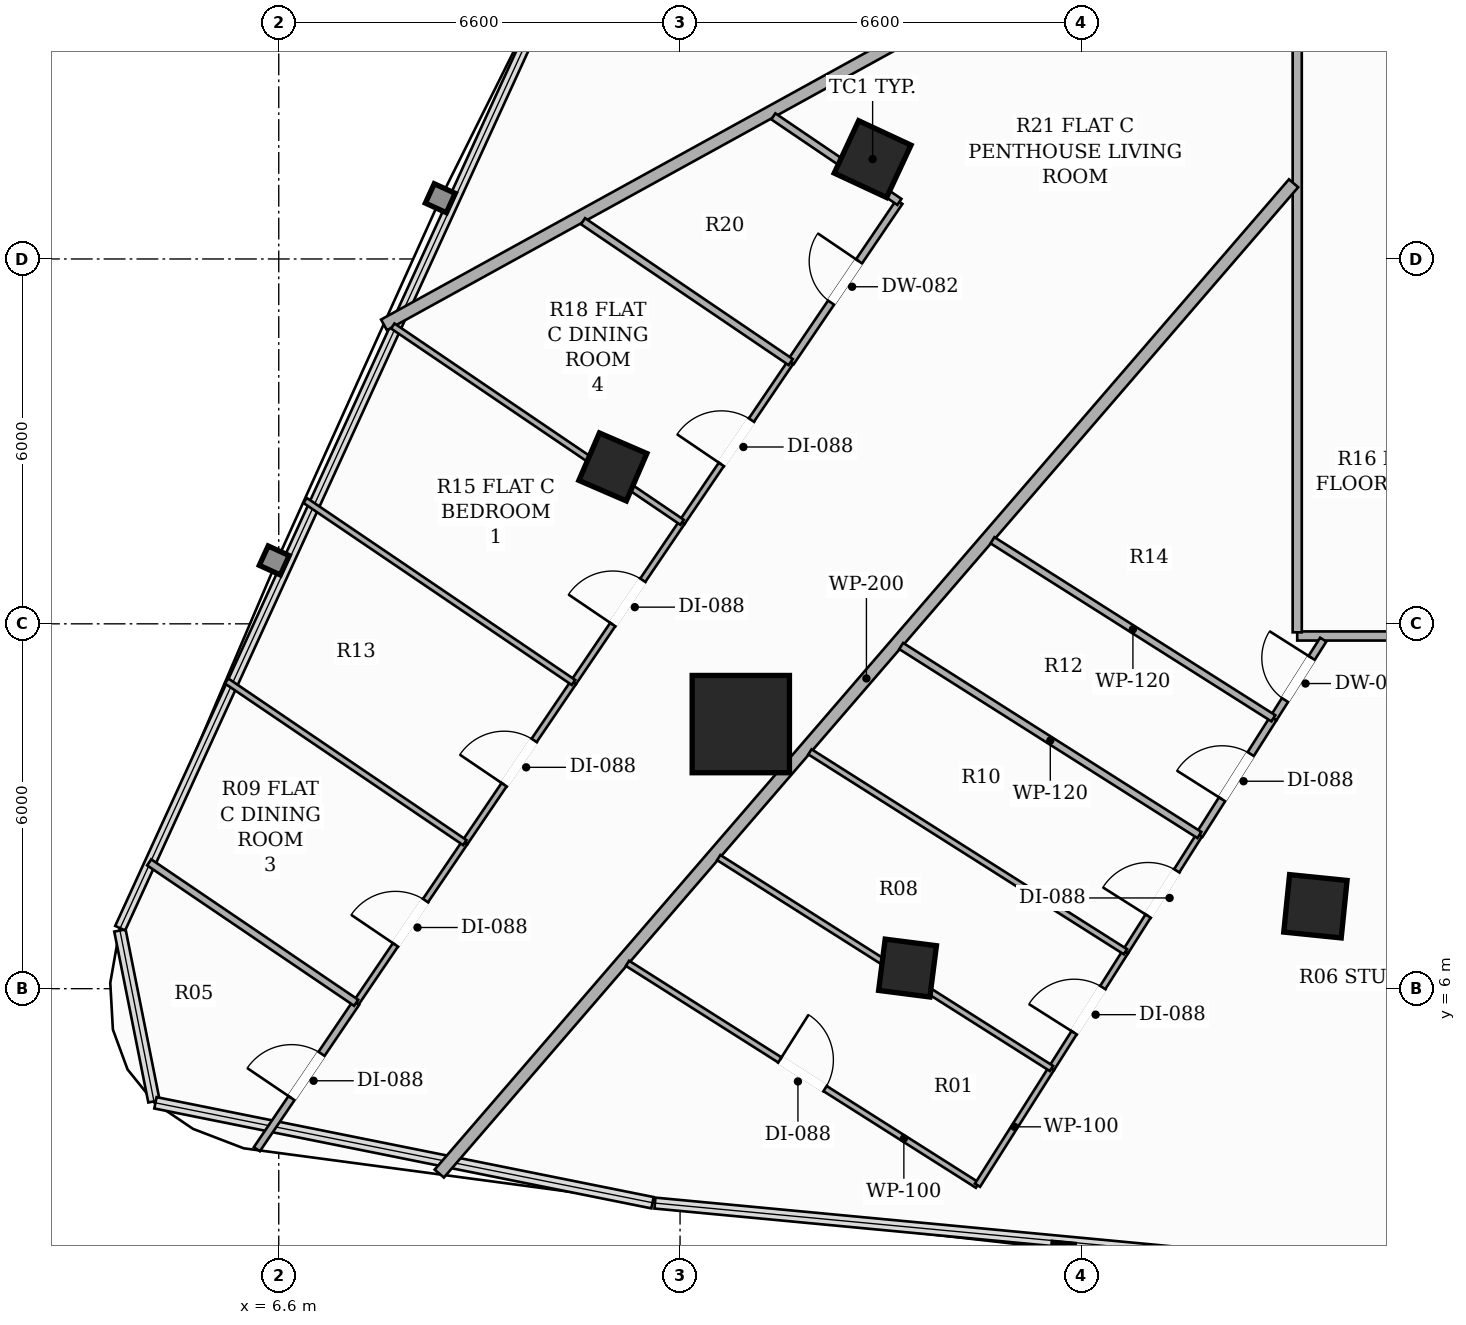
"""IFC4 building model, lengths in metres.
Left out: names, types, materials, properties, quantities, classifications, styles, units other than length and angle.
Written with IfcOpenShell. Run it as: python <this file> out.ifc"""

import sys

from ifc_helpers import new_model, si_unit, direction, frame, frame_2d, origin, origin_2d, place, context, subcontext, project, spatial, rectangle, hollow_rectangle, extrude, element, fill, save


model = new_model("IFC4")
c1 = context("Model", 3, precision=1e-05, world=origin(), true_north=direction((0.0, 1.0)))
c2 = subcontext(c1, "Body", "Model", "MODEL_VIEW")
j1 = project(units=[si_unit("LENGTHUNIT", "METRE"), si_unit("PLANEANGLEUNIT", "RADIAN")], contexts=[c1])
p1 = place(None, origin())
s1 = spatial("IfcSite", under=j1, at=p1, CompositionType="ELEMENT")
p2 = place(p1, origin())
s2 = spatial("IfcBuilding", under=s1, at=p2, CompositionType="ELEMENT")
p3 = place(p2, frame((0.0, 0.0, 26.9)))
s3 = spatial("IfcBuildingStorey", under=s2, at=p3, CompositionType="ELEMENT", Elevation=26.9)
p4 = place(p3, frame((14.199, 10.351, 0.0), z_axis=(0.0, 0.0, 1.0), x_axis=(1.0, 0.0, 0.0)))
e1 = element("IfcColumn", 1, at=p4, inside=s3, PredefinedType="COLUMN", context=c2, shape_type="SweptSolid", body=[
    extrude(hollow_rectangle(XDim=1.6, YDim=1.6, WallThickness=0.05, at=origin_2d()), origin(), (0.0, 0.0, 1.0), 3.3),
])
for number, where, z_axis, x_axis in (
    (2, (16.367, 19.642, 0.0), (0.0, 0.0, 1.0), (0.423, 0.906, 0.0)),
    (3, (23.649, 7.355, 0.0), (0.0, 0.0, 1.0), (-0.995, 0.101, 0.0)),
):
    element("IfcColumn", number, at=place(p3, frame(where, z_axis=z_axis, x_axis=x_axis)), inside=s3, PredefinedType="COLUMN", context=c2, shape_type="SweptSolid", body=[
        extrude(hollow_rectangle(XDim=0.95, YDim=0.95, WallThickness=0.032, at=origin_2d()), origin(), (0.0, 0.0, 1.0), 3.3),
    ])
for number, where, z_axis, x_axis in (
    (4, (12.095, 14.58, 0.0), (0.0, 0.0, 1.0), (0.397, 0.918, 0.0)),
    (5, (16.941, 6.339, 0.0), (0.0, 0.0, 1.0), (-0.992, 0.127, 0.0)),
):
    element("IfcColumn", number, at=place(p3, frame(where, z_axis=z_axis, x_axis=x_axis)), inside=s3, PredefinedType="COLUMN", context=c2, shape_type="SweptSolid", body=[
        extrude(hollow_rectangle(XDim=0.85, YDim=0.85, WallThickness=0.028, at=origin_2d()), origin(), (0.0, 0.0, 1.0), 3.3),
    ])
p5 = place(p3, frame((42.59, 11.8, 0.0), z_axis=(0.0, 0.0, 1.0), x_axis=(-1.0, 0.0, 0.0)))
e6 = element("IfcWall", 6, at=p5, inside=s3, PredefinedType="PARTITIONING", context=c2, shape_type="SweptSolid", body=[
    extrude(rectangle(XDim=19.24, YDim=0.15, at=frame_2d((9.62, 0.0))), origin(), (0.0, 0.0, 1.0), 2.669),
])
p6 = place(p5, frame((12.818, 0.0, 0.0)))
e7 = element("IfcOpeningElement", 7, at=p6, cuts=e6, PredefinedType="OPENING", context=c2, shape_type="SweptSolid", body=[
    extrude(rectangle(XDim=0.92, YDim=2.15, at=frame_2d((0.46, 1.075))), frame((0.0, 0.085, 0.0), z_axis=(0.0, -1.0, 0.0), x_axis=(1.0, 0.0, 0.0)), (0.0, 0.0, 1.0), 0.17),
])
p7 = place(p5, frame((3.519, 0.0, 0.0)))
e8 = element("IfcOpeningElement", 8, at=p7, cuts=e6, PredefinedType="OPENING", context=c2, shape_type="SweptSolid", body=[
    extrude(rectangle(XDim=0.88, YDim=2.1, at=frame_2d((0.44, 1.05))), frame((0.0, 0.085, 0.0), z_axis=(0.0, -1.0, 0.0), x_axis=(1.0, 0.0, 0.0)), (0.0, 0.0, 1.0), 0.17),
])
p8 = place(p3, frame((23.35, 11.86, 0.0), z_axis=(0.0, 0.0, 1.0), x_axis=(0.0, 1.0, 0.0)))
e9 = element("IfcWall", 9, at=p8, inside=s3, PredefinedType="PARTITIONING", context=c2, shape_type="SweptSolid", body=[
    extrude(rectangle(XDim=25.04, YDim=0.15, at=frame_2d((12.52, 0.0))), origin(), (0.0, 0.0, 1.0), 2.413),
])
p9 = place(p8, frame((9.872, 0.0, 0.0)))
e10 = element("IfcOpeningElement", 10, at=p9, cuts=e9, PredefinedType="OPENING", context=c2, shape_type="SweptSolid", body=[
    extrude(rectangle(XDim=0.92, YDim=2.15, at=frame_2d((0.46, 1.075))), frame((0.0, 0.085, 0.0), z_axis=(0.0, -1.0, 0.0), x_axis=(1.0, 0.0, 0.0)), (0.0, 0.0, 1.0), 0.17),
])
p10 = place(p8, frame((18.578, 0.0, 0.0)))
e11 = element("IfcOpeningElement", 11, at=p10, cuts=e9, PredefinedType="OPENING", context=c2, shape_type="SweptSolid", body=[
    extrude(rectangle(XDim=0.88, YDim=2.1, at=frame_2d((0.44, 1.05))), frame((0.0, 0.085, 0.0), z_axis=(0.0, -1.0, 0.0), x_axis=(1.0, 0.0, 0.0)), (0.0, 0.0, 1.0), 0.17),
])
p11 = place(p3, frame((9.24, 2.959, 0.0), z_axis=(0.0, 0.0, 1.0), x_axis=(0.653213734957, 0.757173570896, 0.0)))
e12 = element("IfcWall", 12, at=p11, inside=s3, PredefinedType="PARTITIONING", context=c2, shape_type="SweptSolid", body=[
    extrude(rectangle(XDim=21.509, YDim=0.2, at=frame_2d((10.754, 0.0))), origin(), (0.0, 0.0, 1.0), 2.413),
])
p12 = place(p3, frame((8.331, 16.916, 0.0), z_axis=(0.0, 0.0, 1.0), x_axis=(0.875977946948, 0.482351154721, 0.0)))
e13 = element("IfcWall", 13, at=p12, inside=s3, PredefinedType="PARTITIONING", context=c2, shape_type="SweptSolid", body=[
    extrude(rectangle(XDim=17.077, YDim=0.2, at=frame_2d((8.539, 0.0))), origin(), (0.0, 0.0, 1.0), 2.413),
])
p13 = place(p3, frame((22.958, 10.446, 0.0), z_axis=(0.0, 0.0, 1.0), x_axis=(0.535317457649, 0.844650945383, 0.0)))
e14 = element("IfcWall", 14, at=p13, inside=s3, PredefinedType="PARTITIONING", context=c2, shape_type="SweptSolid", body=[
    extrude(rectangle(XDim=1.532, YDim=0.12, at=frame_2d((0.766, 0.0))), origin(), (0.0, 0.0, 1.0), 3.06),
])
p14 = place(p13, frame((0.356, 0.0, 0.0)))
e15 = element("IfcOpeningElement", 15, at=p14, cuts=e14, PredefinedType="OPENING", context=c2, shape_type="SweptSolid", body=[
    extrude(rectangle(XDim=0.82, YDim=2.1, at=frame_2d((0.41, 1.05))), frame((0.0, 0.07, 0.0), z_axis=(0.0, -1.0, 0.0), x_axis=(1.0, 0.0, 0.0)), (0.0, 0.0, 1.0), 0.14),
])
p15 = place(p3, frame((21.741, 8.527, 0.0), z_axis=(0.0, 0.0, 1.0), x_axis=(0.535588747522, 0.844478947948, 0.0)))
e16 = element("IfcWall", 16, at=p15, inside=s3, PredefinedType="PARTITIONING", context=c2, shape_type="SweptSolid", body=[
    extrude(rectangle(XDim=2.272, YDim=0.12, at=frame_2d((1.136, 0.0))), origin(), (0.0, 0.0, 1.0), 3.06),
])
p16 = place(p15, frame((0.696, 0.0, 0.0)))
e17 = element("IfcOpeningElement", 17, at=p16, cuts=e16, PredefinedType="OPENING", context=c2, shape_type="SweptSolid", body=[
    extrude(rectangle(XDim=0.88, YDim=2.1, at=frame_2d((0.44, 1.05))), frame((0.0, 0.07, 0.0), z_axis=(0.0, -1.0, 0.0), x_axis=(1.0, 0.0, 0.0)), (0.0, 0.0, 1.0), 0.14),
])
p17 = place(p3, frame((12.335, 6.417, 0.0), z_axis=(0.0, 0.0, 1.0), x_axis=(0.844634990869, -0.535342630657, 0.0)))
e18 = element("IfcWall", 18, at=p17, inside=s3, PredefinedType="PARTITIONING", context=c2, shape_type="SweptSolid", body=[
    extrude(rectangle(XDim=6.816, YDim=0.1, at=frame_2d((3.408, 0.0))), origin(), (0.0, 0.0, 1.0), 2.619),
])
p18 = place(p17, frame((2.968, 0.0, 0.0)))
e19 = element("IfcOpeningElement", 19, at=p18, cuts=e18, PredefinedType="OPENING", context=c2, shape_type="SweptSolid", body=[
    extrude(rectangle(XDim=0.88, YDim=2.1, at=frame_2d((0.44, 1.05))), frame((0.0, 0.06, 0.0), z_axis=(0.0, -1.0, 0.0), x_axis=(1.0, 0.0, 0.0)), (0.0, 0.0, 1.0), 0.12),
])
p19 = place(p3, frame((18.092, 2.768, 0.0), z_axis=(0.0, 0.0, 1.0), x_axis=(0.535087860904, 0.844796414003, 0.0)))
e20 = element("IfcWall", 20, at=p19, inside=s3, PredefinedType="PARTITIONING", context=c2, shape_type="SweptSolid", body=[
    extrude(rectangle(XDim=2.273, YDim=0.1, at=frame_2d((1.136, 0.0))), origin(), (0.0, 0.0, 1.0), 3.06),
])
p20 = place(p3, frame((19.308, 4.688, 0.0), z_axis=(0.0, 0.0, 1.0), x_axis=(0.535512120593, 0.844527541705, 0.0)))
e21 = element("IfcWall", 21, at=p20, inside=s3, PredefinedType="PARTITIONING", context=c2, shape_type="SweptSolid", body=[
    extrude(rectangle(XDim=2.272, YDim=0.1, at=frame_2d((1.136, 0.0))), origin(), (0.0, 0.0, 1.0), 2.413),
])
p21 = place(p20, frame((0.696, 0.0, 0.0)))
e22 = element("IfcOpeningElement", 22, at=p21, cuts=e21, PredefinedType="OPENING", context=c2, shape_type="SweptSolid", body=[
    extrude(rectangle(XDim=0.88, YDim=2.1, at=frame_2d((0.44, 1.05))), frame((0.0, 0.06, 0.0), z_axis=(0.0, -1.0, 0.0), x_axis=(1.0, 0.0, 0.0)), (0.0, 0.0, 1.0), 0.12),
])
p22 = place(p3, frame((20.525, 6.607, 0.0), z_axis=(0.0, 0.0, 1.0), x_axis=(0.53503930364, 0.844827167864, 0.0)))
e23 = element("IfcWall", 23, at=p22, inside=s3, PredefinedType="PARTITIONING", context=c2, shape_type="SweptSolid", body=[
    extrude(rectangle(XDim=2.273, YDim=0.1, at=frame_2d((1.136, 0.0))), origin(), (0.0, 0.0, 1.0), 2.413),
])
p23 = place(p22, frame((0.696, 0.0, 0.0)))
e24 = element("IfcOpeningElement", 24, at=p23, cuts=e23, PredefinedType="OPENING", context=c2, shape_type="SweptSolid", body=[
    extrude(rectangle(XDim=0.88, YDim=2.1, at=frame_2d((0.44, 1.05))), frame((0.0, 0.06, 0.0), z_axis=(0.0, -1.0, 0.0), x_axis=(1.0, 0.0, 0.0)), (0.0, 0.0, 1.0), 0.12),
])
p24 = place(p3, frame((22.958, 10.446, 0.0), z_axis=(0.0, 0.0, 1.0), x_axis=(-0.844661668189, 0.535300538289, 0.0)))
e25 = element("IfcWall", 25, at=p24, inside=s3, PredefinedType="PARTITIONING", context=c2, shape_type="SweptSolid", body=[
    extrude(rectangle(XDim=5.47, YDim=0.12, at=frame_2d((2.735, 0.0))), origin(), (0.0, 0.0, 1.0), 2.669),
])
p25 = place(p3, frame((21.741, 8.527, 0.0), z_axis=(0.0, 0.0, 1.0), x_axis=(-0.84466254328, 0.535299157463, 0.0)))
e26 = element("IfcWall", 26, at=p25, inside=s3, PredefinedType="PARTITIONING", context=c2, shape_type="SweptSolid", body=[
    extrude(rectangle(XDim=5.806, YDim=0.12, at=frame_2d((2.903, 0.0))), origin(), (0.0, 0.0, 1.0), 2.669),
])
p26 = place(p3, frame((13.836, 8.156, 0.0), z_axis=(0.0, 0.0, 1.0), x_axis=(0.844657780298, -0.535306673023, 0.0)))
e27 = element("IfcWall", 27, at=p26, inside=s3, PredefinedType="PARTITIONING", context=c2, shape_type="SweptSolid", body=[
    extrude(rectangle(XDim=6.479, YDim=0.1, at=frame_2d((3.239, 0.0))), origin(), (0.0, 0.0, 1.0), 2.413),
])
p27 = place(p3, frame((15.336, 9.895, 0.0), z_axis=(0.0, 0.0, 1.0), x_axis=(0.844690904033, -0.535254403666, 0.0)))
e28 = element("IfcWall", 28, at=p27, inside=s3, PredefinedType="PARTITIONING", context=c2, shape_type="SweptSolid", body=[
    extrude(rectangle(XDim=6.143, YDim=0.1, at=frame_2d((3.072, 0.0))), origin(), (0.0, 0.0, 1.0), 2.413),
])
p28 = place(p3, frame((15.02, 16.304, 0.0), z_axis=(0.0, 0.0, 1.0), x_axis=(0.561248235284, 0.827647520621, 0.0)))
e29 = element("IfcWall", 29, at=p28, inside=s3, PredefinedType="PARTITIONING", context=c2, shape_type="SweptSolid", body=[
    extrude(rectangle(XDim=3.184, YDim=0.12, at=frame_2d((1.592, 0.0))), origin(), (0.0, 0.0, 1.0), 2.669),
])
p29 = place(p28, frame((1.182, 0.0, 0.0)))
e30 = element("IfcOpeningElement", 30, at=p29, cuts=e29, PredefinedType="OPENING", context=c2, shape_type="SweptSolid", body=[
    extrude(rectangle(XDim=0.82, YDim=2.1, at=frame_2d((0.41, 1.05))), frame((0.0, 0.07, 0.0), z_axis=(0.0, -1.0, 0.0), x_axis=(1.0, 0.0, 0.0)), (0.0, 0.0, 1.0), 0.14),
])
p30 = place(p3, frame((16.807, 18.939, 0.0), z_axis=(0.0, 0.0, 1.0), x_axis=(-0.82760029168, 0.561317875372, 0.0)))
e31 = element("IfcWall", 31, at=p30, inside=s3, PredefinedType="PARTITIONING", context=c2, shape_type="SweptSolid", body=[
    extrude(rectangle(XDim=2.505, YDim=0.12, at=frame_2d((1.252, 0.0))), origin(), (0.0, 0.0, 1.0), 2.413),
])
p31 = place(p3, frame((6.24, 3.36, 0.0), z_axis=(0.0, 0.0, 1.0), x_axis=(0.561285940218, 0.82762195072, 0.0)))
e32 = element("IfcWall", 32, at=p31, inside=s3, PredefinedType="PARTITIONING", context=c2, shape_type="SweptSolid", body=[
    extrude(rectangle(XDim=2.909, YDim=0.12, at=frame_2d((1.455, 0.0))), origin(), (0.0, 0.0, 1.0), 3.06),
])
p32 = place(p31, frame((1.015, 0.0, 0.0)))
e33 = element("IfcOpeningElement", 33, at=p32, cuts=e32, PredefinedType="OPENING", context=c2, shape_type="SweptSolid", body=[
    extrude(rectangle(XDim=0.88, YDim=2.1, at=frame_2d((0.44, 1.05))), frame((0.0, 0.07, 0.0), z_axis=(0.0, -1.0, 0.0), x_axis=(1.0, 0.0, 0.0)), (0.0, 0.0, 1.0), 0.14),
])
p33 = place(p3, frame((11.447, 11.036, 0.0), z_axis=(0.0, 0.0, 1.0), x_axis=(0.561180574224, 0.827693399221, 0.0)))
e34 = element("IfcWall", 34, at=p33, inside=s3, PredefinedType="PARTITIONING", context=c2, shape_type="SweptSolid", body=[
    extrude(rectangle(XDim=3.182, YDim=0.1, at=frame_2d((1.591, 0.0))), origin(), (0.0, 0.0, 1.0), 2.413),
])
p34 = place(p33, frame((1.151, 0.0, 0.0)))
e35 = element("IfcOpeningElement", 35, at=p34, cuts=e34, PredefinedType="OPENING", context=c2, shape_type="SweptSolid", body=[
    extrude(rectangle(XDim=0.88, YDim=2.1, at=frame_2d((0.44, 1.05))), frame((0.0, 0.06, 0.0), z_axis=(0.0, -1.0, 0.0), x_axis=(1.0, 0.0, 0.0)), (0.0, 0.0, 1.0), 0.12),
])
p35 = place(p3, frame((9.66, 8.402, 0.0), z_axis=(0.0, 0.0, 1.0), x_axis=(0.561478909132, 0.827491048048, 0.0)))
e36 = element("IfcWall", 36, at=p35, inside=s3, PredefinedType="PARTITIONING", context=c2, shape_type="SweptSolid", body=[
    extrude(rectangle(XDim=3.183, YDim=0.1, at=frame_2d((1.591, 0.0))), origin(), (0.0, 0.0, 1.0), 2.619),
])
p36 = place(p35, frame((1.151, 0.0, 0.0)))
e37 = element("IfcOpeningElement", 37, at=p36, cuts=e36, PredefinedType="OPENING", context=c2, shape_type="SweptSolid", body=[
    extrude(rectangle(XDim=0.88, YDim=2.1, at=frame_2d((0.44, 1.05))), frame((0.0, 0.06, 0.0), z_axis=(0.0, -1.0, 0.0), x_axis=(1.0, 0.0, 0.0)), (0.0, 0.0, 1.0), 0.12),
])
p37 = place(p3, frame((7.873, 5.768, 0.0), z_axis=(0.0, 0.0, 1.0), x_axis=(0.561390746336, 0.827550862442, 0.0)))
e38 = element("IfcWall", 38, at=p37, inside=s3, PredefinedType="PARTITIONING", context=c2, shape_type="SweptSolid", body=[
    extrude(rectangle(XDim=3.183, YDim=0.1, at=frame_2d((1.591, 0.0))), origin(), (0.0, 0.0, 1.0), 2.619),
])
p38 = place(p37, frame((1.151, 0.0, 0.0)))
e39 = element("IfcOpeningElement", 39, at=p38, cuts=e38, PredefinedType="OPENING", context=c2, shape_type="SweptSolid", body=[
    extrude(rectangle(XDim=0.88, YDim=2.1, at=frame_2d((0.44, 1.05))), frame((0.0, 0.06, 0.0), z_axis=(0.0, -1.0, 0.0), x_axis=(1.0, 0.0, 0.0)), (0.0, 0.0, 1.0), 0.12),
])
p39 = place(p3, frame((13.233, 13.67, 0.0), z_axis=(0.0, 0.0, 1.0), x_axis=(0.561443272398, 0.827515227582, 0.0)))
e40 = element("IfcWall", 40, at=p39, inside=s3, PredefinedType="PARTITIONING", context=c2, shape_type="SweptSolid", body=[
    extrude(rectangle(XDim=3.183, YDim=0.1, at=frame_2d((1.592, 0.0))), origin(), (0.0, 0.0, 1.0), 3.06),
])
p40 = place(p39, frame((1.151, 0.0, 0.0)))
e41 = element("IfcOpeningElement", 41, at=p40, cuts=e40, PredefinedType="OPENING", context=c2, shape_type="SweptSolid", body=[
    extrude(rectangle(XDim=0.88, YDim=2.1, at=frame_2d((0.44, 1.05))), frame((0.0, 0.06, 0.0), z_axis=(0.0, -1.0, 0.0), x_axis=(1.0, 0.0, 0.0)), (0.0, 0.0, 1.0), 0.12),
])
p41 = place(p3, frame((15.02, 16.304, 0.0), z_axis=(0.0, 0.0, 1.0), x_axis=(-0.827573908317, 0.561356772715, 0.0)))
e42 = element("IfcWall", 42, at=p41, inside=s3, PredefinedType="PARTITIONING", context=c2, shape_type="SweptSolid", body=[
    extrude(rectangle(XDim=4.128, YDim=0.12, at=frame_2d((2.064, 0.0))), origin(), (0.0, 0.0, 1.0), 2.413),
])
p42 = place(p3, frame((4.469, 8.077, 0.0), z_axis=(0.0, 0.0, 1.0), x_axis=(0.827594933475, -0.561325775362, 0.0)))
e43 = element("IfcWall", 43, at=p42, inside=s3, PredefinedType="PARTITIONING", context=c2, shape_type="SweptSolid", body=[
    extrude(rectangle(XDim=4.113, YDim=0.12, at=frame_2d((2.057, 0.0))), origin(), (0.0, 0.0, 1.0), 3.06),
])
p43 = place(p3, frame((11.447, 11.036, 0.0), z_axis=(0.0, 0.0, 1.0), x_axis=(-0.827600351797, 0.561317786735, 0.0)))
e44 = element("IfcWall", 44, at=p43, inside=s3, PredefinedType="PARTITIONING", context=c2, shape_type="SweptSolid", body=[
    extrude(rectangle(XDim=5.332, YDim=0.1, at=frame_2d((2.666, 0.0))), origin(), (0.0, 0.0, 1.0), 3.06),
])
p44 = place(p3, frame((8.475, 16.898, 0.0), z_axis=(0.0, 0.0, 1.0), x_axis=(0.827515231239, -0.561443267007, 0.0)))
e45 = element("IfcWall", 45, at=p44, inside=s3, PredefinedType="PARTITIONING", context=c2, shape_type="SweptSolid", body=[
    extrude(rectangle(XDim=5.75, YDim=0.1, at=frame_2d((2.875, 0.0))), origin(), (0.0, 0.0, 1.0), 2.413),
])
p45 = place(p3, frame((9.66, 8.402, 0.0), z_axis=(0.0, 0.0, 1.0), x_axis=(-0.827540801305, 0.561405577257, 0.0)))
e46 = element("IfcWall", 46, at=p45, inside=s3, PredefinedType="PARTITIONING", context=c2, shape_type="SweptSolid", body=[
    extrude(rectangle(XDim=4.734, YDim=0.1, at=frame_2d((2.367, 0.0))), origin(), (0.0, 0.0, 1.0), 2.619),
])
p46 = place(p14, origin())
e47 = element("IfcDoor", 47, at=p46, inside=s3, OperationType="SINGLE_SWING_RIGHT", PredefinedType="DOOR", context=c2, shape_type="SweptSolid", body=[
    extrude(rectangle(XDim=0.82, YDim=2.1, at=frame_2d((0.41, 1.05))), frame((0.0, 0.025, 0.0), z_axis=(0.0, -1.0, 0.0), x_axis=(1.0, 0.0, 0.0)), (0.0, 0.0, 1.0), 0.05),
])
fill(e15, e47)
p47 = place(p16, origin())
e48 = element("IfcDoor", 48, at=p47, inside=s3, OperationType="SINGLE_SWING_LEFT", PredefinedType="DOOR", context=c2, shape_type="SweptSolid", body=[
    extrude(rectangle(XDim=0.88, YDim=2.1, at=frame_2d((0.44, 1.05))), frame((0.0, 0.025, 0.0), z_axis=(0.0, -1.0, 0.0), x_axis=(1.0, 0.0, 0.0)), (0.0, 0.0, 1.0), 0.05),
])
fill(e17, e48)
p48 = place(p18, origin())
e49 = element("IfcDoor", 49, at=p48, inside=s3, OperationType="SINGLE_SWING_LEFT", PredefinedType="DOOR", context=c2, shape_type="SweptSolid", body=[
    extrude(rectangle(XDim=0.88, YDim=2.1, at=frame_2d((0.44, 1.05))), frame((0.0, 0.025, 0.0), z_axis=(0.0, -1.0, 0.0), x_axis=(1.0, 0.0, 0.0)), (0.0, 0.0, 1.0), 0.05),
])
fill(e19, e49)
p49 = place(p21, origin())
e50 = element("IfcDoor", 50, at=p49, inside=s3, OperationType="SINGLE_SWING_LEFT", PredefinedType="DOOR", context=c2, shape_type="SweptSolid", body=[
    extrude(rectangle(XDim=0.88, YDim=2.1, at=frame_2d((0.44, 1.05))), frame((0.0, 0.025, 0.0), z_axis=(0.0, -1.0, 0.0), x_axis=(1.0, 0.0, 0.0)), (0.0, 0.0, 1.0), 0.05),
])
fill(e22, e50)
p50 = place(p23, origin())
e51 = element("IfcDoor", 51, at=p50, inside=s3, OperationType="SINGLE_SWING_LEFT", PredefinedType="DOOR", context=c2, shape_type="SweptSolid", body=[
    extrude(rectangle(XDim=0.88, YDim=2.1, at=frame_2d((0.44, 1.05))), frame((0.0, 0.025, 0.0), z_axis=(0.0, -1.0, 0.0), x_axis=(1.0, 0.0, 0.0)), (0.0, 0.0, 1.0), 0.05),
])
fill(e24, e51)
p51 = place(p29, origin())
e52 = element("IfcDoor", 52, at=p51, inside=s3, OperationType="SINGLE_SWING_RIGHT", PredefinedType="DOOR", context=c2, shape_type="SweptSolid", body=[
    extrude(rectangle(XDim=0.82, YDim=2.1, at=frame_2d((0.41, 1.05))), frame((0.0, 0.025, 0.0), z_axis=(0.0, -1.0, 0.0), x_axis=(1.0, 0.0, 0.0)), (0.0, 0.0, 1.0), 0.05),
])
fill(e30, e52)
p52 = place(p32, origin())
e53 = element("IfcDoor", 53, at=p52, inside=s3, OperationType="SINGLE_SWING_LEFT", PredefinedType="DOOR", context=c2, shape_type="SweptSolid", body=[
    extrude(rectangle(XDim=0.88, YDim=2.1, at=frame_2d((0.44, 1.05))), frame((0.0, 0.025, 0.0), z_axis=(0.0, -1.0, 0.0), x_axis=(1.0, 0.0, 0.0)), (0.0, 0.0, 1.0), 0.05),
])
fill(e33, e53)
p53 = place(p34, origin())
e54 = element("IfcDoor", 54, at=p53, inside=s3, OperationType="SINGLE_SWING_LEFT", PredefinedType="DOOR", context=c2, shape_type="SweptSolid", body=[
    extrude(rectangle(XDim=0.88, YDim=2.1, at=frame_2d((0.44, 1.05))), frame((0.0, 0.025, 0.0), z_axis=(0.0, -1.0, 0.0), x_axis=(1.0, 0.0, 0.0)), (0.0, 0.0, 1.0), 0.05),
])
fill(e35, e54)
p54 = place(p36, origin())
e55 = element("IfcDoor", 55, at=p54, inside=s3, OperationType="SINGLE_SWING_LEFT", PredefinedType="DOOR", context=c2, shape_type="SweptSolid", body=[
    extrude(rectangle(XDim=0.88, YDim=2.1, at=frame_2d((0.44, 1.05))), frame((0.0, 0.025, 0.0), z_axis=(0.0, -1.0, 0.0), x_axis=(1.0, 0.0, 0.0)), (0.0, 0.0, 1.0), 0.05),
])
fill(e37, e55)
p55 = place(p38, origin())
e56 = element("IfcDoor", 56, at=p55, inside=s3, OperationType="SINGLE_SWING_LEFT", PredefinedType="DOOR", context=c2, shape_type="SweptSolid", body=[
    extrude(rectangle(XDim=0.88, YDim=2.1, at=frame_2d((0.44, 1.05))), frame((0.0, 0.025, 0.0), z_axis=(0.0, -1.0, 0.0), x_axis=(1.0, 0.0, 0.0)), (0.0, 0.0, 1.0), 0.05),
])
fill(e39, e56)
p56 = place(p40, origin())
e57 = element("IfcDoor", 57, at=p56, inside=s3, OperationType="SINGLE_SWING_LEFT", PredefinedType="DOOR", context=c2, shape_type="SweptSolid", body=[
    extrude(rectangle(XDim=0.88, YDim=2.1, at=frame_2d((0.44, 1.05))), frame((0.0, 0.025, 0.0), z_axis=(0.0, -1.0, 0.0), x_axis=(1.0, 0.0, 0.0)), (0.0, 0.0, 1.0), 0.05),
])
fill(e41, e57)
save(model, sys.argv[1])
